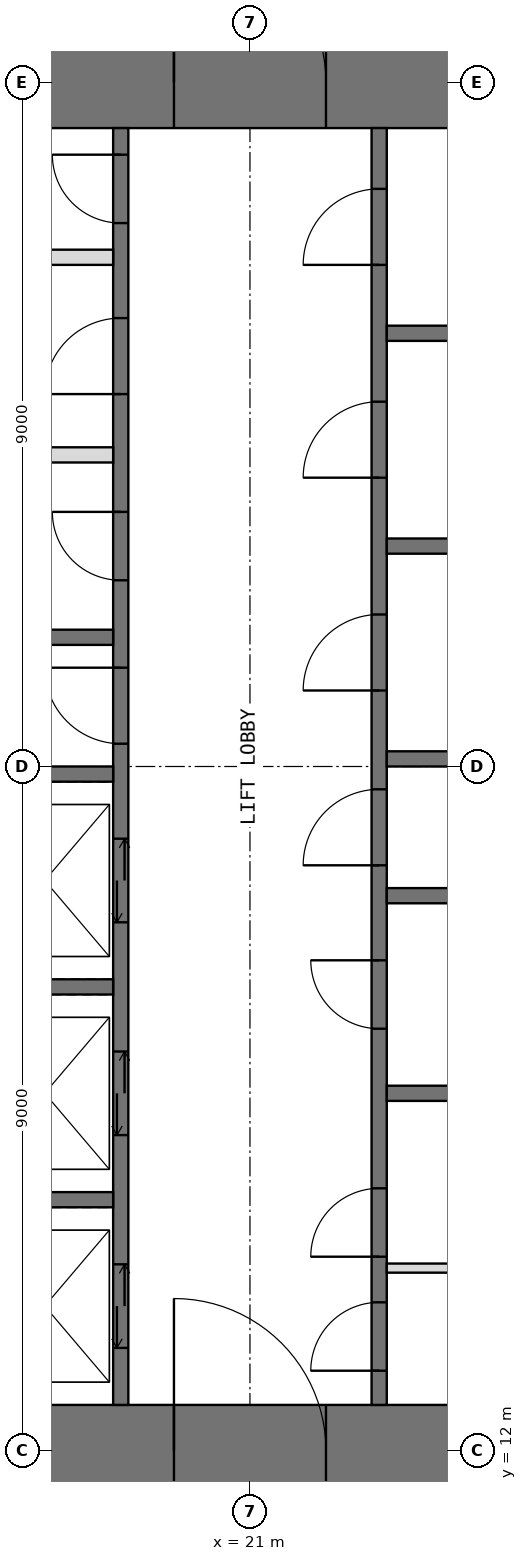
"""IFC4 building model, lengths in metres.
Left out: names, types, materials, properties, quantities, classifications, styles, units other than length and angle.
Written with IfcOpenShell. Run it as: python <this file> out.ifc"""

import sys

from ifc_helpers import new_model, si_unit, direction, frame, frame_2d, origin, place, context, subcontext, project, spatial, rectangle, extrude, element, fill, save


model = new_model("IFC4")
c1 = context("Model", 3, precision=1e-05, world=origin(), true_north=direction((0.0, 1.0)))
c2 = subcontext(c1, "Body", "Model", "MODEL_VIEW")
j1 = project(units=[si_unit("LENGTHUNIT", "METRE"), si_unit("PLANEANGLEUNIT", "RADIAN")], contexts=[c1])
p1 = place(None, origin())
s1 = spatial("IfcSite", under=j1, at=p1, CompositionType="ELEMENT")
p2 = place(p1, origin())
s2 = spatial("IfcBuilding", under=s1, at=p2, CompositionType="ELEMENT")
p3 = place(p2, frame((0.0, 0.0, 248.2)))
s3 = spatial("IfcBuildingStorey", under=s2, at=p3, CompositionType="ELEMENT", Elevation=248.2)
p4 = place(p3, frame((11.4, 12.0, -0.05), z_axis=(0.0, 0.0, 1.0), x_axis=(1.0, 0.0, 0.0)))
e1 = element("IfcWall", 1, at=p4, inside=s3, PredefinedType="SHEAR", context=c2, shape_type="SweptSolid", body=[
    extrude(rectangle(XDim=19.2, YDim=1.2, at=frame_2d((9.6, 0.0))), origin(), (0.0, 0.0, 1.0), 4.2),
])
p5 = place(p4, frame((8.6, 0.0, 0.05)))
e2 = element("IfcOpeningElement", 2, at=p5, cuts=e1, PredefinedType="OPENING", context=c2, shape_type="SweptSolid", body=[
    extrude(rectangle(XDim=2.0, YDim=2.2, at=frame_2d((1.0, 1.1))), frame((0.0, 0.61, 0.0), z_axis=(0.0, -1.0, 0.0), x_axis=(1.0, 0.0, 0.0)), (0.0, 0.0, 1.0), 1.22),
])
p6 = place(p3, frame((11.4, 30.0, -0.05), z_axis=(0.0, 0.0, 1.0), x_axis=(1.0, 0.0, 0.0)))
e3 = element("IfcWall", 3, at=p6, inside=s3, PredefinedType="SHEAR", context=c2, shape_type="SweptSolid", body=[
    extrude(rectangle(XDim=19.2, YDim=1.2, at=frame_2d((9.6, 0.0))), origin(), (0.0, 0.0, 1.0), 4.2),
])
p7 = place(p6, frame((8.6, 0.0, 0.05)))
e4 = element("IfcOpeningElement", 4, at=p7, cuts=e3, PredefinedType="OPENING", context=c2, shape_type="SweptSolid", body=[
    extrude(rectangle(XDim=2.0, YDim=2.2, at=frame_2d((1.0, 1.1))), frame((0.0, 0.61, 0.0), z_axis=(0.0, -1.0, 0.0), x_axis=(1.0, 0.0, 0.0)), (0.0, 0.0, 1.0), 1.22),
])
p8 = place(p3, frame((19.3, 12.6, -0.05), z_axis=(0.0, 0.0, 1.0), x_axis=(0.0, 1.0, 0.0)))
e5 = element("IfcWall", 5, at=p8, inside=s3, PredefinedType="SHEAR", context=c2, shape_type="SweptSolid", body=[
    extrude(rectangle(XDim=16.8, YDim=0.2, at=frame_2d((8.4, 0.0))), origin(), (0.0, 0.0, 1.0), 4.2),
])
p9 = place(p8, frame((8.7, 0.0, 0.05)))
e6 = element("IfcOpeningElement", 6, at=p9, cuts=e5, PredefinedType="OPENING", context=c2, shape_type="SweptSolid", body=[
    extrude(rectangle(XDim=1.0, YDim=2.2, at=frame_2d((0.5, 1.1))), frame((0.0, 0.11, 0.0), z_axis=(0.0, -1.0, 0.0), x_axis=(1.0, 0.0, 0.0)), (0.0, 0.0, 1.0), 0.22),
])
p10 = place(p8, frame((10.85, 0.0, 0.05)))
e7 = element("IfcOpeningElement", 7, at=p10, cuts=e5, PredefinedType="OPENING", context=c2, shape_type="SweptSolid", body=[
    extrude(rectangle(XDim=0.9, YDim=2.2, at=frame_2d((0.45, 1.1))), frame((0.0, 0.11, 0.0), z_axis=(0.0, -1.0, 0.0), x_axis=(1.0, 0.0, 0.0)), (0.0, 0.0, 1.0), 0.22),
])
p11 = place(p8, frame((13.3, 0.0, 0.05)))
e8 = element("IfcOpeningElement", 8, at=p11, cuts=e5, PredefinedType="OPENING", context=c2, shape_type="SweptSolid", body=[
    extrude(rectangle(XDim=1.0, YDim=2.2, at=frame_2d((0.5, 1.1))), frame((0.0, 0.11, 0.0), z_axis=(0.0, -1.0, 0.0), x_axis=(1.0, 0.0, 0.0)), (0.0, 0.0, 1.0), 0.22),
])
p12 = place(p8, frame((15.55, 0.0, 0.05)))
e9 = element("IfcOpeningElement", 9, at=p12, cuts=e5, PredefinedType="OPENING", context=c2, shape_type="SweptSolid", body=[
    extrude(rectangle(XDim=0.9, YDim=2.2, at=frame_2d((0.45, 1.1))), frame((0.0, 0.11, 0.0), z_axis=(0.0, -1.0, 0.0), x_axis=(1.0, 0.0, 0.0)), (0.0, 0.0, 1.0), 0.22),
])
p13 = place(p8, frame((0.75, 0.0, 0.05)))
e10 = element("IfcOpeningElement", 10, at=p13, cuts=e5, PredefinedType="OPENING", context=c2, shape_type="SweptSolid", body=[
    extrude(rectangle(XDim=1.1, YDim=2.2, at=frame_2d((0.55, 1.1))), frame((0.0, 0.11, 0.0), z_axis=(0.0, -1.0, 0.0), x_axis=(1.0, 0.0, 0.0)), (0.0, 0.0, 1.0), 0.22),
])
p14 = place(p8, frame((3.55, 0.0, 0.05)))
e11 = element("IfcOpeningElement", 11, at=p14, cuts=e5, PredefinedType="OPENING", context=c2, shape_type="SweptSolid", body=[
    extrude(rectangle(XDim=1.1, YDim=2.2, at=frame_2d((0.55, 1.1))), frame((0.0, 0.11, 0.0), z_axis=(0.0, -1.0, 0.0), x_axis=(1.0, 0.0, 0.0)), (0.0, 0.0, 1.0), 0.22),
])
p15 = place(p8, frame((6.35, 0.0, 0.05)))
e12 = element("IfcOpeningElement", 12, at=p15, cuts=e5, PredefinedType="OPENING", context=c2, shape_type="SweptSolid", body=[
    extrude(rectangle(XDim=1.1, YDim=2.2, at=frame_2d((0.55, 1.1))), frame((0.0, 0.11, 0.0), z_axis=(0.0, -1.0, 0.0), x_axis=(1.0, 0.0, 0.0)), (0.0, 0.0, 1.0), 0.22),
])
p16 = place(p3, frame((22.7, 12.6, -0.05), z_axis=(0.0, 0.0, 1.0), x_axis=(0.0, 1.0, 0.0)))
e13 = element("IfcWall", 13, at=p16, inside=s3, PredefinedType="SHEAR", context=c2, shape_type="SweptSolid", body=[
    extrude(rectangle(XDim=16.8, YDim=0.2, at=frame_2d((8.4, 0.0))), origin(), (0.0, 0.0, 1.0), 4.2),
])
p17 = place(p16, frame((0.45, 0.0, 0.05)))
e14 = element("IfcOpeningElement", 14, at=p17, cuts=e13, PredefinedType="OPENING", context=c2, shape_type="SweptSolid", body=[
    extrude(rectangle(XDim=0.9, YDim=2.2, at=frame_2d((0.45, 1.1))), frame((0.0, 0.11, 0.0), z_axis=(0.0, -1.0, 0.0), x_axis=(1.0, 0.0, 0.0)), (0.0, 0.0, 1.0), 0.22),
])
p18 = place(p16, frame((7.1, 0.0, 0.05)))
e15 = element("IfcOpeningElement", 15, at=p18, cuts=e13, PredefinedType="OPENING", context=c2, shape_type="SweptSolid", body=[
    extrude(rectangle(XDim=1.0, YDim=2.2, at=frame_2d((0.5, 1.1))), frame((0.0, 0.11, 0.0), z_axis=(0.0, -1.0, 0.0), x_axis=(1.0, 0.0, 0.0)), (0.0, 0.0, 1.0), 0.22),
])
p19 = place(p16, frame((1.95, 0.0, 0.05)))
e16 = element("IfcOpeningElement", 16, at=p19, cuts=e13, PredefinedType="OPENING", context=c2, shape_type="SweptSolid", body=[
    extrude(rectangle(XDim=0.9, YDim=2.2, at=frame_2d((0.45, 1.1))), frame((0.0, 0.11, 0.0), z_axis=(0.0, -1.0, 0.0), x_axis=(1.0, 0.0, 0.0)), (0.0, 0.0, 1.0), 0.22),
])
p20 = place(p16, frame((4.95, 0.0, 0.05)))
e17 = element("IfcOpeningElement", 17, at=p20, cuts=e13, PredefinedType="OPENING", context=c2, shape_type="SweptSolid", body=[
    extrude(rectangle(XDim=0.9, YDim=2.2, at=frame_2d((0.45, 1.1))), frame((0.0, 0.11, 0.0), z_axis=(0.0, -1.0, 0.0), x_axis=(1.0, 0.0, 0.0)), (0.0, 0.0, 1.0), 0.22),
])
p21 = place(p16, frame((9.4, 0.0, 0.05)))
e18 = element("IfcOpeningElement", 18, at=p21, cuts=e13, PredefinedType="OPENING", context=c2, shape_type="SweptSolid", body=[
    extrude(rectangle(XDim=1.0, YDim=2.2, at=frame_2d((0.5, 1.1))), frame((0.0, 0.11, 0.0), z_axis=(0.0, -1.0, 0.0), x_axis=(1.0, 0.0, 0.0)), (0.0, 0.0, 1.0), 0.22),
])
p22 = place(p16, frame((12.2, 0.0, 0.05)))
e19 = element("IfcOpeningElement", 19, at=p22, cuts=e13, PredefinedType="OPENING", context=c2, shape_type="SweptSolid", body=[
    extrude(rectangle(XDim=1.0, YDim=2.2, at=frame_2d((0.5, 1.1))), frame((0.0, 0.11, 0.0), z_axis=(0.0, -1.0, 0.0), x_axis=(1.0, 0.0, 0.0)), (0.0, 0.0, 1.0), 0.22),
])
p23 = place(p16, frame((15.0, 0.0, 0.05)))
e20 = element("IfcOpeningElement", 20, at=p23, cuts=e13, PredefinedType="OPENING", context=c2, shape_type="SweptSolid", body=[
    extrude(rectangle(XDim=1.0, YDim=2.2, at=frame_2d((0.5, 1.1))), frame((0.0, 0.11, 0.0), z_axis=(0.0, -1.0, 0.0), x_axis=(1.0, 0.0, 0.0)), (0.0, 0.0, 1.0), 0.22),
])
for number, where, z_axis, x_axis in (
    (21, (16.0, 15.3, -0.05), (0.0, 0.0, 1.0), (1.0, 0.0, 0.0)),
    (22, (16.0, 18.1, -0.05), (0.0, 0.0, 1.0), (1.0, 0.0, 0.0)),
    (23, (16.0, 20.9, -0.05), (0.0, 0.0, 1.0), (1.0, 0.0, 0.0)),
    (24, (16.0, 22.7, -0.05), (0.0, 0.0, 1.0), (1.0, 0.0, 0.0)),
):
    element("IfcWall", number, at=place(p3, frame(where, z_axis=z_axis, x_axis=x_axis)), inside=s3, PredefinedType="SHEAR", context=c2, shape_type="SweptSolid", body=[
        extrude(rectangle(XDim=3.2, YDim=0.2, at=frame_2d((1.6, 0.0))), origin(), (0.0, 0.0, 1.0), 4.2),
    ])
for number, where, z_axis, x_axis in (
    (25, (16.0, 25.1, 0.0), (0.0, 0.0, 1.0), (1.0, 0.0, 0.0)),
    (26, (16.0, 27.7, 0.0), (0.0, 0.0, 1.0), (1.0, 0.0, 0.0)),
):
    element("IfcWall", number, at=place(p3, frame(where, z_axis=z_axis, x_axis=x_axis)), inside=s3, PredefinedType="PARTITIONING", context=c2, shape_type="SweptSolid", body=[
        extrude(rectangle(XDim=3.2, YDim=0.2, at=frame_2d((1.6, 0.0))), origin(), (0.0, 0.0, 1.0), 3.95),
    ])
for number, where, z_axis, x_axis in (
    (27, (22.8, 16.7, -0.05), (0.0, 0.0, 1.0), (1.0, 0.0, 0.0)),
    (28, (22.8, 19.3, -0.05), (0.0, 0.0, 1.0), (1.0, 0.0, 0.0)),
    (29, (22.8, 21.1, -0.05), (0.0, 0.0, 1.0), (1.0, 0.0, 0.0)),
    (30, (22.8, 23.9, -0.05), (0.0, 0.0, 1.0), (1.0, 0.0, 0.0)),
    (31, (22.8, 26.7, -0.05), (0.0, 0.0, 1.0), (1.0, 0.0, 0.0)),
):
    element("IfcWall", number, at=place(p3, frame(where, z_axis=z_axis, x_axis=x_axis)), inside=s3, PredefinedType="SHEAR", context=c2, shape_type="SweptSolid", body=[
        extrude(rectangle(XDim=3.2, YDim=0.2, at=frame_2d((1.6, 0.0))), origin(), (0.0, 0.0, 1.0), 4.2),
    ])
p24 = place(p3, frame((22.8, 14.4, 0.0), z_axis=(0.0, 0.0, 1.0), x_axis=(1.0, 0.0, 0.0)))
e32 = element("IfcWall", 32, at=p24, inside=s3, PredefinedType="PARTITIONING", context=c2, shape_type="SweptSolid", body=[
    extrude(rectangle(XDim=3.2, YDim=0.12, at=frame_2d((1.6, 0.0))), origin(), (0.0, 0.0, 1.0), 3.95),
])
p25 = place(p5, origin())
e33 = element("IfcDoor", 33, at=p25, inside=s3, OperationType="DOUBLE_DOOR_SINGLE_SWING", PredefinedType="DOOR", context=c2, shape_type="SweptSolid", body=[
    extrude(rectangle(XDim=2.0, YDim=2.2, at=frame_2d((1.0, 1.1))), frame((0.0, 0.025, 0.0), z_axis=(0.0, -1.0, 0.0), x_axis=(1.0, 0.0, 0.0)), (0.0, 0.0, 1.0), 0.05),
])
fill(e2, e33)
p26 = place(p7, origin())
e34 = element("IfcDoor", 34, at=p26, inside=s3, OperationType="DOUBLE_DOOR_SINGLE_SWING", PredefinedType="DOOR", context=c2, shape_type="SweptSolid", body=[
    extrude(rectangle(XDim=2.0, YDim=2.2, at=frame_2d((1.0, 1.1))), frame((0.0, 0.025, 0.0), z_axis=(0.0, -1.0, 0.0), x_axis=(1.0, 0.0, 0.0)), (0.0, 0.0, 1.0), 0.05),
])
fill(e4, e34)
p27 = place(p17, origin())
e35 = element("IfcDoor", 35, at=p27, inside=s3, OperationType="SINGLE_SWING_LEFT", PredefinedType="DOOR", context=c2, shape_type="SweptSolid", body=[
    extrude(rectangle(XDim=0.9, YDim=2.2, at=frame_2d((0.45, 1.1))), frame((0.0, 0.025, 0.0), z_axis=(0.0, -1.0, 0.0), x_axis=(1.0, 0.0, 0.0)), (0.0, 0.0, 1.0), 0.05),
])
fill(e14, e35)
p28 = place(p9, origin())
e36 = element("IfcDoor", 36, at=p28, inside=s3, OperationType="SINGLE_SWING_RIGHT", PredefinedType="DOOR", context=c2, shape_type="SweptSolid", body=[
    extrude(rectangle(XDim=1.0, YDim=2.2, at=frame_2d((0.5, 1.1))), frame((0.0, 0.025, 0.0), z_axis=(0.0, -1.0, 0.0), x_axis=(1.0, 0.0, 0.0)), (0.0, 0.0, 1.0), 0.05),
])
fill(e6, e36)
p29 = place(p18, origin())
e37 = element("IfcDoor", 37, at=p29, inside=s3, OperationType="SINGLE_SWING_LEFT", PredefinedType="DOOR", context=c2, shape_type="SweptSolid", body=[
    extrude(rectangle(XDim=1.0, YDim=2.2, at=frame_2d((0.5, 1.1))), frame((0.0, 0.025, 0.0), z_axis=(0.0, -1.0, 0.0), x_axis=(1.0, 0.0, 0.0)), (0.0, 0.0, 1.0), 0.05),
])
fill(e15, e37)
p30 = place(p10, origin())
e38 = element("IfcDoor", 38, at=p30, inside=s3, OperationType="SINGLE_SWING_RIGHT", PredefinedType="DOOR", context=c2, shape_type="SweptSolid", body=[
    extrude(rectangle(XDim=0.9, YDim=2.2, at=frame_2d((0.45, 1.1))), frame((0.0, 0.025, 0.0), z_axis=(0.0, -1.0, 0.0), x_axis=(1.0, 0.0, 0.0)), (0.0, 0.0, 1.0), 0.05),
])
fill(e7, e38)
p31 = place(p11, origin())
e39 = element("IfcDoor", 39, at=p31, inside=s3, OperationType="SINGLE_SWING_LEFT", PredefinedType="DOOR", context=c2, shape_type="SweptSolid", body=[
    extrude(rectangle(XDim=1.0, YDim=2.2, at=frame_2d((0.5, 1.1))), frame((0.0, 0.025, 0.0), z_axis=(0.0, -1.0, 0.0), x_axis=(1.0, 0.0, 0.0)), (0.0, 0.0, 1.0), 0.05),
])
fill(e8, e39)
p32 = place(p12, origin())
e40 = element("IfcDoor", 40, at=p32, inside=s3, OperationType="SINGLE_SWING_RIGHT", PredefinedType="DOOR", context=c2, shape_type="SweptSolid", body=[
    extrude(rectangle(XDim=0.9, YDim=2.2, at=frame_2d((0.45, 1.1))), frame((0.0, 0.025, 0.0), z_axis=(0.0, -1.0, 0.0), x_axis=(1.0, 0.0, 0.0)), (0.0, 0.0, 1.0), 0.05),
])
fill(e9, e40)
p33 = place(p19, origin())
e41 = element("IfcDoor", 41, at=p33, inside=s3, OperationType="SINGLE_SWING_LEFT", PredefinedType="DOOR", context=c2, shape_type="SweptSolid", body=[
    extrude(rectangle(XDim=0.9, YDim=2.2, at=frame_2d((0.45, 1.1))), frame((0.0, 0.025, 0.0), z_axis=(0.0, -1.0, 0.0), x_axis=(1.0, 0.0, 0.0)), (0.0, 0.0, 1.0), 0.05),
])
fill(e16, e41)
p34 = place(p20, origin())
e42 = element("IfcDoor", 42, at=p34, inside=s3, OperationType="SINGLE_SWING_RIGHT", PredefinedType="DOOR", context=c2, shape_type="SweptSolid", body=[
    extrude(rectangle(XDim=0.9, YDim=2.2, at=frame_2d((0.45, 1.1))), frame((0.0, 0.025, 0.0), z_axis=(0.0, -1.0, 0.0), x_axis=(1.0, 0.0, 0.0)), (0.0, 0.0, 1.0), 0.05),
])
fill(e17, e42)
p35 = place(p21, origin())
e43 = element("IfcDoor", 43, at=p35, inside=s3, OperationType="SINGLE_SWING_LEFT", PredefinedType="DOOR", context=c2, shape_type="SweptSolid", body=[
    extrude(rectangle(XDim=1.0, YDim=2.2, at=frame_2d((0.5, 1.1))), frame((0.0, 0.025, 0.0), z_axis=(0.0, -1.0, 0.0), x_axis=(1.0, 0.0, 0.0)), (0.0, 0.0, 1.0), 0.05),
])
fill(e18, e43)
p36 = place(p22, origin())
e44 = element("IfcDoor", 44, at=p36, inside=s3, OperationType="SINGLE_SWING_LEFT", PredefinedType="DOOR", context=c2, shape_type="SweptSolid", body=[
    extrude(rectangle(XDim=1.0, YDim=2.2, at=frame_2d((0.5, 1.1))), frame((0.0, 0.025, 0.0), z_axis=(0.0, -1.0, 0.0), x_axis=(1.0, 0.0, 0.0)), (0.0, 0.0, 1.0), 0.05),
])
fill(e19, e44)
p37 = place(p23, origin())
e45 = element("IfcDoor", 45, at=p37, inside=s3, OperationType="SINGLE_SWING_LEFT", PredefinedType="DOOR", context=c2, shape_type="SweptSolid", body=[
    extrude(rectangle(XDim=1.0, YDim=2.2, at=frame_2d((0.5, 1.1))), frame((0.0, 0.025, 0.0), z_axis=(0.0, -1.0, 0.0), x_axis=(1.0, 0.0, 0.0)), (0.0, 0.0, 1.0), 0.05),
])
fill(e20, e45)
p38 = place(p13, origin())
e46 = element("IfcDoor", 46, at=p38, inside=s3, OperationType="DOUBLE_DOOR_SLIDING", PredefinedType="DOOR", context=c2, shape_type="SweptSolid", body=[
    extrude(rectangle(XDim=1.1, YDim=2.2, at=frame_2d((0.55, 1.1))), frame((0.0, 0.025, 0.0), z_axis=(0.0, -1.0, 0.0), x_axis=(1.0, 0.0, 0.0)), (0.0, 0.0, 1.0), 0.05),
])
fill(e10, e46)
p39 = place(p14, origin())
e47 = element("IfcDoor", 47, at=p39, inside=s3, OperationType="DOUBLE_DOOR_SLIDING", PredefinedType="DOOR", context=c2, shape_type="SweptSolid", body=[
    extrude(rectangle(XDim=1.1, YDim=2.2, at=frame_2d((0.55, 1.1))), frame((0.0, 0.025, 0.0), z_axis=(0.0, -1.0, 0.0), x_axis=(1.0, 0.0, 0.0)), (0.0, 0.0, 1.0), 0.05),
])
fill(e11, e47)
p40 = place(p15, origin())
e48 = element("IfcDoor", 48, at=p40, inside=s3, OperationType="DOUBLE_DOOR_SLIDING", PredefinedType="DOOR", context=c2, shape_type="SweptSolid", body=[
    extrude(rectangle(XDim=1.1, YDim=2.2, at=frame_2d((0.55, 1.1))), frame((0.0, 0.025, 0.0), z_axis=(0.0, -1.0, 0.0), x_axis=(1.0, 0.0, 0.0)), (0.0, 0.0, 1.0), 0.05),
])
fill(e12, e48)
save(model, sys.argv[1])
